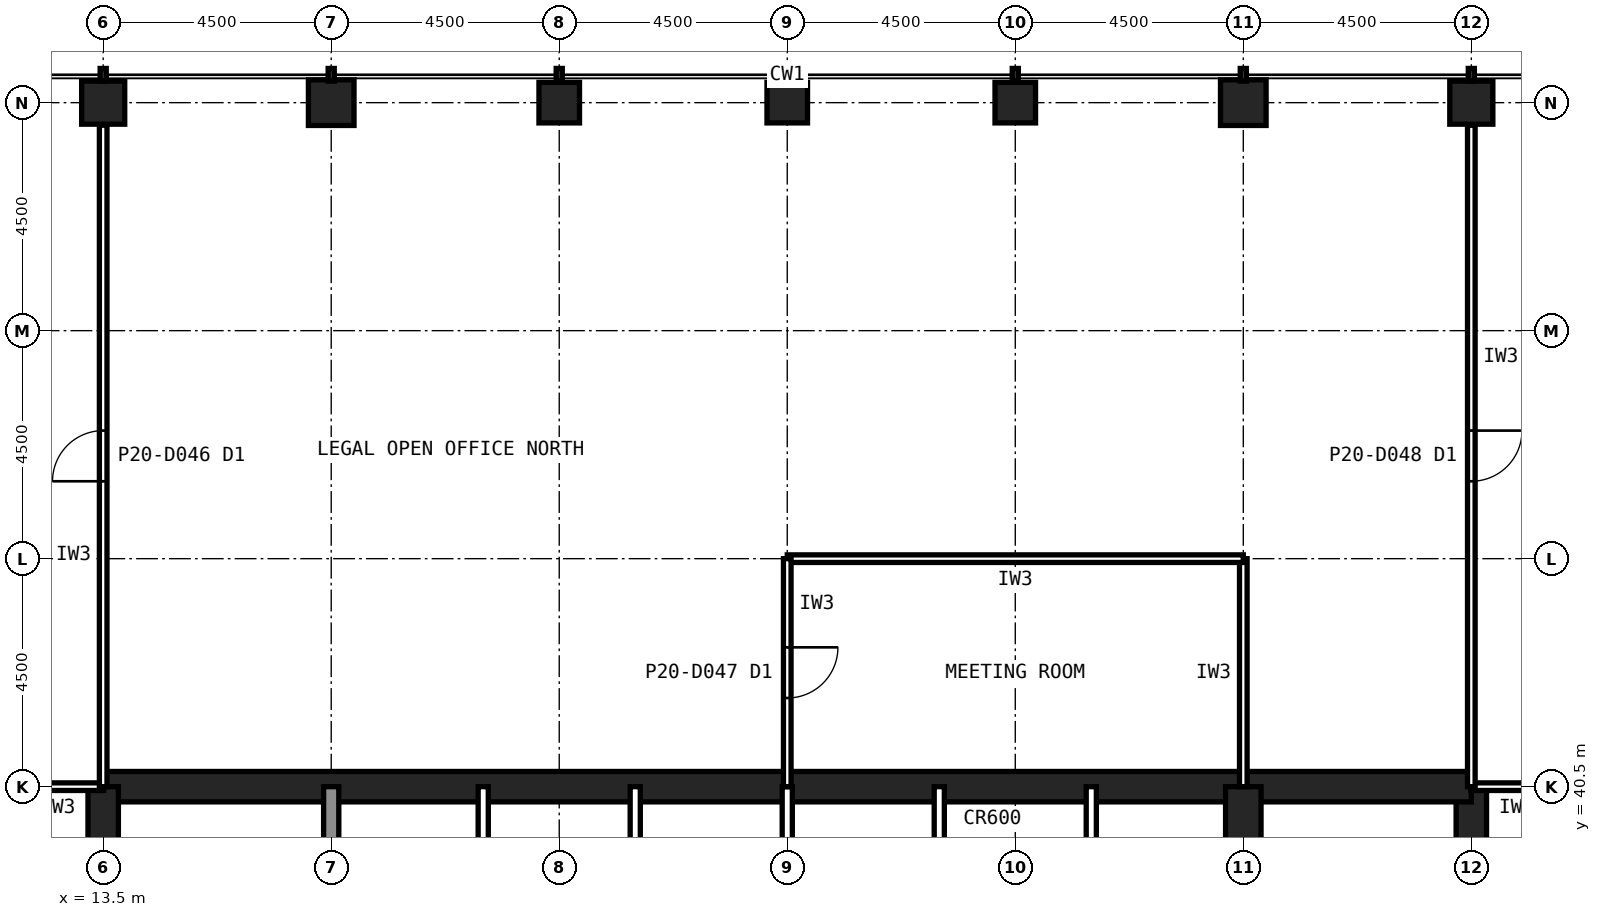
"""IFC4 building model, lengths in metres.
Left out: names, types, materials, properties, quantities, classifications, styles, units other than length and angle.
Written with IfcOpenShell. Run it as: python <this file> out.ifc"""

import sys

from ifc_helpers import new_model, si_unit, direction, frame, frame_2d, origin, origin_2d, place, context, subcontext, project, spatial, rectangle, hollow_rectangle, extrude, element, fill, save


model = new_model("IFC4")
c1 = context("Model", 3, precision=1e-05, world=origin(), true_north=direction((0.0, 1.0)))
c2 = subcontext(c1, "Body", "Model", "MODEL_VIEW")
j1 = project(units=[si_unit("LENGTHUNIT", "METRE"), si_unit("PLANEANGLEUNIT", "RADIAN")], contexts=[c1])
p1 = place(None, origin())
s1 = spatial("IfcSite", under=j1, at=p1, CompositionType="ELEMENT")
p2 = place(p1, origin())
s2 = spatial("IfcBuilding", under=s1, at=p2, CompositionType="ELEMENT")
p3 = place(p2, frame((0.0, 0.0, 87.8)))
s3 = spatial("IfcBuildingStorey", under=s2, at=p3, CompositionType="ELEMENT", Elevation=87.8)
p4 = place(p3, frame((40.5, 54.0, 0.0), z_axis=(0.0, 0.0, 1.0), x_axis=(1.0, 0.0, 0.0)))
e1 = element("IfcColumn", 1, at=p4, inside=s3, PredefinedType="COLUMN", context=c2, shape_type="SweptSolid", body=[
    extrude(hollow_rectangle(XDim=0.85, YDim=0.85, WallThickness=0.05, at=origin_2d()), origin(), (0.0, 0.0, 1.0), 4.2),
])
p5 = place(p3, frame((36.0, 54.0, 0.0), z_axis=(0.0, 0.0, 1.0), x_axis=(1.0, 0.0, 0.0)))
e2 = element("IfcColumn", 2, at=p5, inside=s3, PredefinedType="COLUMN", context=c2, shape_type="SweptSolid", body=[
    extrude(hollow_rectangle(XDim=0.9, YDim=0.9, WallThickness=0.063, at=origin_2d()), origin(), (0.0, 0.0, 1.0), 4.2),
])
for number, where, z_axis, x_axis in (
    (3, (31.5, 54.0, 0.0), (0.0, 0.0, 1.0), (1.0, 0.0, 0.0)),
    (4, (27.0, 54.0, 0.0), (0.0, 0.0, 1.0), (1.0, 0.0, 0.0)),
    (5, (22.5, 54.0, 0.0), (0.0, 0.0, 1.0), (1.0, 0.0, 0.0)),
):
    element("IfcColumn", number, at=place(p3, frame(where, z_axis=z_axis, x_axis=x_axis)), inside=s3, PredefinedType="COLUMN", context=c2, shape_type="SweptSolid", body=[
        extrude(hollow_rectangle(XDim=0.8, YDim=0.8, WallThickness=0.045, at=origin_2d()), origin(), (0.0, 0.0, 1.0), 4.2),
    ])
p6 = place(p3, frame((18.0, 54.0, 0.0), z_axis=(0.0, 0.0, 1.0), x_axis=(1.0, 0.0, 0.0)))
e6 = element("IfcColumn", 6, at=p6, inside=s3, PredefinedType="COLUMN", context=c2, shape_type="SweptSolid", body=[
    extrude(hollow_rectangle(XDim=0.9, YDim=0.9, WallThickness=0.063, at=origin_2d()), origin(), (0.0, 0.0, 1.0), 4.2),
])
p7 = place(p3, frame((13.5, 54.0, 0.0), z_axis=(0.0, 0.0, 1.0), x_axis=(1.0, 0.0, 0.0)))
e7 = element("IfcColumn", 7, at=p7, inside=s3, PredefinedType="COLUMN", context=c2, shape_type="SweptSolid", body=[
    extrude(hollow_rectangle(XDim=0.85, YDim=0.85, WallThickness=0.05, at=origin_2d()), origin(), (0.0, 0.0, 1.0), 4.2),
])
p8 = place(p3, frame((40.5, 13.5, 0.0), z_axis=(0.0, 0.0, 1.0), x_axis=(0.0, 1.0, 0.0)))
e8 = element("IfcWall", 8, at=p8, inside=s3, PredefinedType="SHEAR", context=c2, shape_type="SweptSolid", body=[
    extrude(rectangle(XDim=27.0, YDim=0.6, at=frame_2d((13.5, 0.0))), origin(), (0.0, 0.0, 1.0), 4.2),
])
p9 = place(p8, frame((5.85, 0.0, 0.0)))
e9 = element("IfcOpeningElement", 9, at=p9, cuts=e8, PredefinedType="OPENING", context=c2, shape_type="SweptSolid", body=[
    extrude(rectangle(XDim=1.8, YDim=2.1, at=frame_2d((0.9, 1.05))), frame((0.0, 0.31, 0.0), z_axis=(0.0, -1.0, 0.0), x_axis=(1.0, 0.0, 0.0)), (0.0, 0.0, 1.0), 0.62),
])
p10 = place(p8, frame((19.65, 0.0, 0.0)))
e10 = element("IfcOpeningElement", 10, at=p10, cuts=e8, PredefinedType="OPENING", context=c2, shape_type="SweptSolid", body=[
    extrude(rectangle(XDim=1.2, YDim=2.1, at=frame_2d((0.6, 1.05))), frame((0.0, 0.31, 0.0), z_axis=(0.0, -1.0, 0.0), x_axis=(1.0, 0.0, 0.0)), (0.0, 0.0, 1.0), 0.62),
])
p11 = place(p3, frame((40.5, 40.5, 0.0), z_axis=(0.0, 0.0, 1.0), x_axis=(-1.0, 0.0, 0.0)))
e11 = element("IfcWall", 11, at=p11, inside=s3, PredefinedType="SHEAR", context=c2, shape_type="SweptSolid", body=[
    extrude(rectangle(XDim=27.0, YDim=0.6, at=frame_2d((13.5, 0.0))), origin(), (0.0, 0.0, 1.0), 4.2),
])
p12 = place(p3, frame((13.5, 40.5, 0.0), z_axis=(0.0, 0.0, 1.0), x_axis=(0.0, -1.0, 0.0)))
e12 = element("IfcWall", 12, at=p12, inside=s3, PredefinedType="SHEAR", context=c2, shape_type="SweptSolid", body=[
    extrude(rectangle(XDim=27.0, YDim=0.6, at=frame_2d((13.5, 0.0))), origin(), (0.0, 0.0, 1.0), 4.2),
])
p13 = place(p12, frame((19.65, 0.0, 0.0)))
e13 = element("IfcOpeningElement", 13, at=p13, cuts=e12, PredefinedType="OPENING", context=c2, shape_type="SweptSolid", body=[
    extrude(rectangle(XDim=1.2, YDim=2.1, at=frame_2d((0.6, 1.05))), frame((0.0, 0.31, 0.0), z_axis=(0.0, -1.0, 0.0), x_axis=(1.0, 0.0, 0.0)), (0.0, 0.0, 1.0), 0.62),
])
p14 = place(p12, frame((5.85, 0.0, 0.0)))
e14 = element("IfcOpeningElement", 14, at=p14, cuts=e12, PredefinedType="OPENING", context=c2, shape_type="SweptSolid", body=[
    extrude(rectangle(XDim=1.8, YDim=2.1, at=frame_2d((0.9, 1.05))), frame((0.0, 0.31, 0.0), z_axis=(0.0, -1.0, 0.0), x_axis=(1.0, 0.0, 0.0)), (0.0, 0.0, 1.0), 0.62),
])
p15 = place(p3, frame((18.0, 36.0, 0.0), z_axis=(0.0, 0.0, 1.0), x_axis=(0.0, 1.0, 0.0)))
e15 = element("IfcWall", 15, at=p15, inside=s3, PredefinedType="SOLIDWALL", context=c2, shape_type="SweptSolid", body=[
    extrude(rectangle(XDim=4.5, YDim=0.3, at=frame_2d((2.25, 0.0))), origin(), (0.0, 0.0, 1.0), 4.04),
])
p16 = place(p3, frame((36.0, 22.5, 0.0), z_axis=(0.0, 0.0, 1.0), x_axis=(0.0, 1.0, 0.0)))
e16 = element("IfcWall", 16, at=p16, inside=s3, PredefinedType="SHEAR", context=c2, shape_type="SweptSolid", body=[
    extrude(rectangle(XDim=18.0, YDim=0.7, at=frame_2d((9.0, 0.0))), origin(), (0.0, 0.0, 1.0), 4.2),
])
for number, where, z_axis, x_axis in (
    (17, (21.0, 36.0, 0.0), (0.0, 0.0, 1.0), (0.0, 1.0, 0.0)),
    (18, (24.0, 36.0, 0.0), (0.0, 0.0, 1.0), (0.0, 1.0, 0.0)),
    (19, (27.0, 36.0, 0.0), (0.0, 0.0, 1.0), (0.0, 1.0, 0.0)),
    (20, (30.0, 36.0, 0.0), (0.0, 0.0, 1.0), (0.0, 1.0, 0.0)),
    (21, (33.0, 36.0, 0.0), (0.0, 0.0, 1.0), (0.0, 1.0, 0.0)),
):
    element("IfcWall", number, at=place(p3, frame(where, z_axis=z_axis, x_axis=x_axis)), inside=s3, PredefinedType="PARTITIONING", context=c2, shape_type="SweptSolid", body=[
        extrude(rectangle(XDim=4.5, YDim=0.2, at=frame_2d((2.25, 0.0))), origin(), (0.0, 0.0, 1.0), 4.04),
    ])
for number, where, z_axis, x_axis in (
    (22, (13.51, 40.5, 0.0), (0.0, 0.0, 1.0), (-1.0, 0.0, 0.0)),
    (23, (42.3, 40.5, 0.0), (0.0, 0.0, 1.0), (-1.0, 0.0, 0.0)),
):
    element("IfcWall", number, at=place(p3, frame(where, z_axis=z_axis, x_axis=x_axis)), inside=s3, PredefinedType="PARTITIONING", context=c2, shape_type="SweptSolid", body=[
        extrude(rectangle(XDim=1.81, YDim=0.15, at=frame_2d((0.905, 0.0))), origin(), (0.0, 0.0, 1.0), 3.189),
    ])
p17 = place(p3, frame((36.0, 40.5, 0.0), z_axis=(0.0, 0.0, 1.0), x_axis=(0.0, 1.0, 0.0)))
e24 = element("IfcWall", 24, at=p17, inside=s3, PredefinedType="PARTITIONING", context=c2, shape_type="SweptSolid", body=[
    extrude(rectangle(XDim=4.5, YDim=0.15, at=frame_2d((2.25, 0.0))), origin(), (0.0, 0.0, 1.0), 3.189),
])
p18 = place(p3, frame((36.0, 45.0, 0.0), z_axis=(0.0, 0.0, 1.0), x_axis=(-1.0, 0.0, 0.0)))
e25 = element("IfcWall", 25, at=p18, inside=s3, PredefinedType="PARTITIONING", context=c2, shape_type="SweptSolid", body=[
    extrude(rectangle(XDim=9.0, YDim=0.15, at=frame_2d((4.5, 0.0))), origin(), (0.0, 0.0, 1.0), 4.04),
])
p19 = place(p3, frame((27.0, 45.0, 0.0), z_axis=(0.0, 0.0, 1.0), x_axis=(0.0, -1.0, 0.0)))
e26 = element("IfcWall", 26, at=p19, inside=s3, PredefinedType="PARTITIONING", context=c2, shape_type="SweptSolid", body=[
    extrude(rectangle(XDim=4.5, YDim=0.15, at=frame_2d((2.25, 0.0))), origin(), (0.0, 0.0, 1.0), 3.189),
])
p20 = place(p19, frame((1.75, 0.0, 0.0)))
e27 = element("IfcOpeningElement", 27, at=p20, cuts=e26, PredefinedType="OPENING", context=c2, shape_type="SweptSolid", body=[
    extrude(rectangle(XDim=1.0, YDim=2.1, at=frame_2d((0.5, 1.05))), frame((0.0, 0.085, 0.0), z_axis=(0.0, -1.0, 0.0), x_axis=(1.0, 0.0, 0.0)), (0.0, 0.0, 1.0), 0.17),
])
p21 = place(p3, frame((40.5, 53.555, 0.0), z_axis=(0.0, 0.0, 1.0), x_axis=(0.0, -1.0, 0.0)))
e28 = element("IfcWall", 28, at=p21, inside=s3, PredefinedType="PARTITIONING", context=c2, shape_type="SweptSolid", body=[
    extrude(rectangle(XDim=13.055, YDim=0.15, at=frame_2d((6.527, 0.0))), origin(), (0.0, 0.0, 1.0), 3.189),
])
p22 = place(p21, frame((6.028, 0.0, 0.0)))
e29 = element("IfcOpeningElement", 29, at=p22, cuts=e28, PredefinedType="OPENING", context=c2, shape_type="SweptSolid", body=[
    extrude(rectangle(XDim=1.0, YDim=2.1, at=frame_2d((0.5, 1.05))), frame((0.0, 0.085, 0.0), z_axis=(0.0, -1.0, 0.0), x_axis=(1.0, 0.0, 0.0)), (0.0, 0.0, 1.0), 0.17),
])
p23 = place(p3, frame((13.5, 40.5, 0.0), z_axis=(0.0, 0.0, 1.0), x_axis=(0.0, 1.0, 0.0)))
e30 = element("IfcWall", 30, at=p23, inside=s3, PredefinedType="PARTITIONING", context=c2, shape_type="SweptSolid", body=[
    extrude(rectangle(XDim=13.055, YDim=0.15, at=frame_2d((6.527, 0.0))), origin(), (0.0, 0.0, 1.0), 3.189),
])
p24 = place(p23, frame((6.028, 0.0, 0.0)))
e31 = element("IfcOpeningElement", 31, at=p24, cuts=e30, PredefinedType="OPENING", context=c2, shape_type="SweptSolid", body=[
    extrude(rectangle(XDim=1.0, YDim=2.1, at=frame_2d((0.5, 1.05))), frame((0.0, 0.085, 0.0), z_axis=(0.0, -1.0, 0.0), x_axis=(1.0, 0.0, 0.0)), (0.0, 0.0, 1.0), 0.17),
])
p25 = place(p20, origin())
e32 = element("IfcDoor", 32, at=p25, inside=s3, OperationType="SINGLE_SWING_LEFT", PredefinedType="DOOR", context=c2, shape_type="SweptSolid", body=[
    extrude(rectangle(XDim=1.0, YDim=2.1, at=frame_2d((0.5, 1.05))), frame((0.0, 0.025, 0.0), z_axis=(0.0, -1.0, 0.0), x_axis=(1.0, 0.0, 0.0)), (0.0, 0.0, 1.0), 0.05),
])
fill(e27, e32)
p26 = place(p22, origin())
e33 = element("IfcDoor", 33, at=p26, inside=s3, OperationType="SINGLE_SWING_LEFT", PredefinedType="DOOR", context=c2, shape_type="SweptSolid", body=[
    extrude(rectangle(XDim=1.0, YDim=2.1, at=frame_2d((0.5, 1.05))), frame((0.0, 0.025, 0.0), z_axis=(0.0, -1.0, 0.0), x_axis=(1.0, 0.0, 0.0)), (0.0, 0.0, 1.0), 0.05),
])
fill(e29, e33)
p27 = place(p24, origin())
e34 = element("IfcDoor", 34, at=p27, inside=s3, OperationType="SINGLE_SWING_LEFT", PredefinedType="DOOR", context=c2, shape_type="SweptSolid", body=[
    extrude(rectangle(XDim=1.0, YDim=2.1, at=frame_2d((0.5, 1.05))), frame((0.0, 0.025, 0.0), z_axis=(0.0, -1.0, 0.0), x_axis=(1.0, 0.0, 0.0)), (0.0, 0.0, 1.0), 0.05),
])
fill(e31, e34)
save(model, sys.argv[1])
